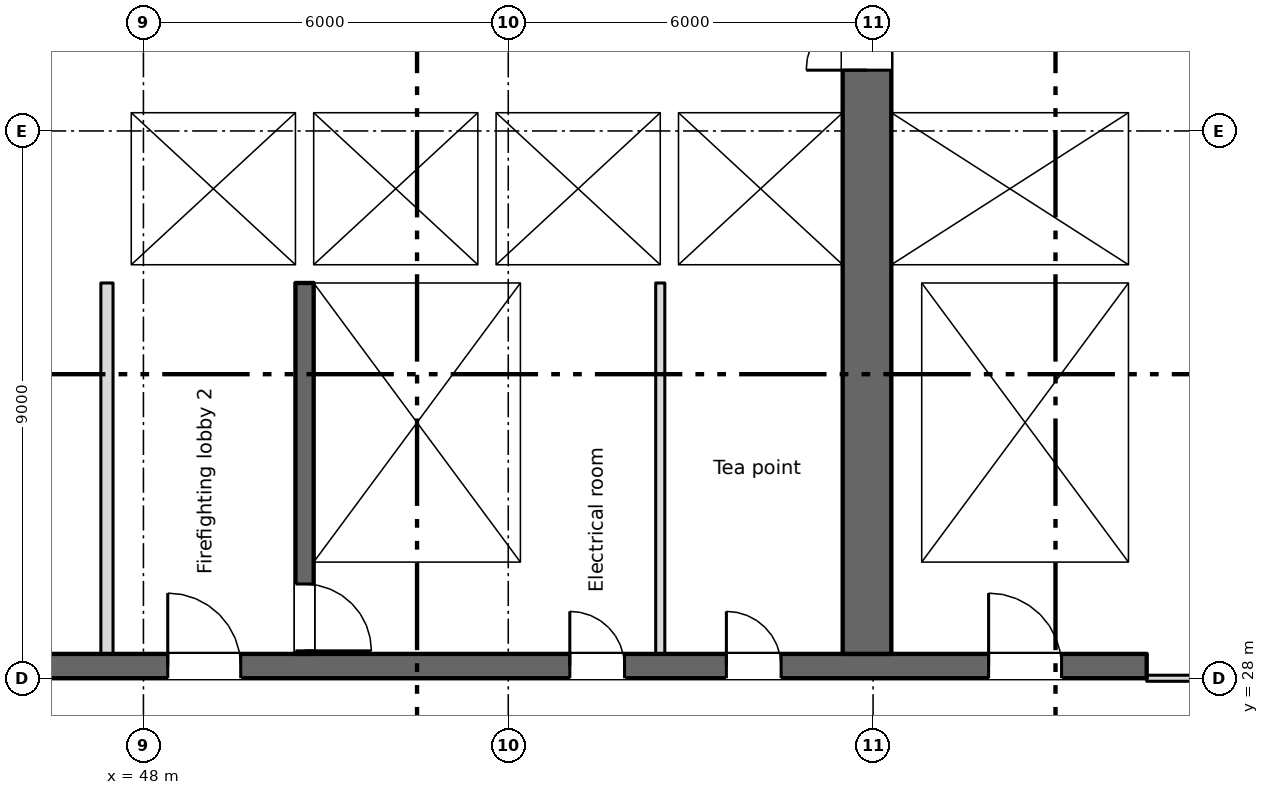
"""IFC4 building model, lengths in metres.
Left out: names, types, materials, properties, quantities, classifications, styles, units other than length and angle.
Written with IfcOpenShell. Run it as: python <this file> out.ifc"""

import sys

from ifc_helpers import new_model, si_unit, direction, frame, frame_2d, origin, place, context, subcontext, project, spatial, rectangle, extrude, element, fill, save


model = new_model("IFC4")
c1 = context("Model", 3, precision=1e-05, world=origin(), true_north=direction((0.0, 1.0)))
c2 = subcontext(c1, "Body", "Model", "MODEL_VIEW")
j1 = project(units=[si_unit("LENGTHUNIT", "METRE"), si_unit("PLANEANGLEUNIT", "RADIAN")], contexts=[c1])
p1 = place(None, origin())
s1 = spatial("IfcSite", under=j1, at=p1, CompositionType="ELEMENT")
p2 = place(p1, origin())
s2 = spatial("IfcBuilding", under=s1, at=p2, CompositionType="ELEMENT")
p3 = place(p2, frame((0.0, 0.0, 132.5)))
s3 = spatial("IfcBuildingStorey", under=s2, at=p3, CompositionType="ELEMENT", Elevation=132.5)
p4 = place(p3, frame((6.7, 28.2, 0.0), z_axis=(0.0, 0.0, 1.0), x_axis=(1.0, 0.0, 0.0)))
e1 = element("IfcWall", 1, at=p4, inside=s3, PredefinedType="SHEAR", context=c2, shape_type="SweptSolid", body=[
    extrude(rectangle(XDim=57.8, YDim=0.4, at=frame_2d((28.9, 0.0))), origin(), (0.0, 0.0, 1.0), 3.35),
])
p5 = place(p4, frame((12.812, 0.0, 0.0)))
e2 = element("IfcOpeningElement", 2, at=p5, cuts=e1, PredefinedType="OPENING", context=c2, shape_type="SweptSolid", body=[
    extrude(rectangle(XDim=0.9, YDim=2.1, at=frame_2d((0.45, 1.05))), frame((0.0, 0.21, 0.0), z_axis=(0.0, -1.0, 0.0), x_axis=(1.0, 0.0, 0.0)), (0.0, 0.0, 1.0), 0.42),
])
p6 = place(p4, frame((15.387, 0.0, 0.0)))
e3 = element("IfcOpeningElement", 3, at=p6, cuts=e1, PredefinedType="OPENING", context=c2, shape_type="SweptSolid", body=[
    extrude(rectangle(XDim=0.9, YDim=2.1, at=frame_2d((0.45, 1.05))), frame((0.0, 0.21, 0.0), z_axis=(0.0, -1.0, 0.0), x_axis=(1.0, 0.0, 0.0)), (0.0, 0.0, 1.0), 0.42),
])
p7 = place(p4, frame((48.312, 0.0, 0.0)))
e4 = element("IfcOpeningElement", 4, at=p7, cuts=e1, PredefinedType="OPENING", context=c2, shape_type="SweptSolid", body=[
    extrude(rectangle(XDim=0.9, YDim=2.1, at=frame_2d((0.45, 1.05))), frame((0.0, 0.21, 0.0), z_axis=(0.0, -1.0, 0.0), x_axis=(1.0, 0.0, 0.0)), (0.0, 0.0, 1.0), 0.42),
])
p8 = place(p4, frame((50.887, 0.0, 0.0)))
e5 = element("IfcOpeningElement", 5, at=p8, cuts=e1, PredefinedType="OPENING", context=c2, shape_type="SweptSolid", body=[
    extrude(rectangle(XDim=0.9, YDim=2.1, at=frame_2d((0.45, 1.05))), frame((0.0, 0.21, 0.0), z_axis=(0.0, -1.0, 0.0), x_axis=(1.0, 0.0, 0.0)), (0.0, 0.0, 1.0), 0.42),
])
p9 = place(p4, frame((0.562, 0.0, 0.0)))
e6 = element("IfcOpeningElement", 6, at=p9, cuts=e1, PredefinedType="OPENING", context=c2, shape_type="SweptSolid", body=[
    extrude(rectangle(XDim=0.9, YDim=2.1, at=frame_2d((0.45, 1.05))), frame((0.0, 0.21, 0.0), z_axis=(0.0, -1.0, 0.0), x_axis=(1.0, 0.0, 0.0)), (0.0, 0.0, 1.0), 0.42),
])
p10 = place(p4, frame((2.137, 0.0, 0.0)))
e7 = element("IfcOpeningElement", 7, at=p10, cuts=e1, PredefinedType="OPENING", context=c2, shape_type="SweptSolid", body=[
    extrude(rectangle(XDim=0.9, YDim=2.1, at=frame_2d((0.45, 1.05))), frame((0.0, 0.21, 0.0), z_axis=(0.0, -1.0, 0.0), x_axis=(1.0, 0.0, 0.0)), (0.0, 0.0, 1.0), 0.42),
])
p11 = place(p4, frame((4.7, 0.0, 0.0)))
e8 = element("IfcOpeningElement", 8, at=p11, cuts=e1, PredefinedType="OPENING", context=c2, shape_type="SweptSolid", body=[
    extrude(rectangle(XDim=1.2, YDim=2.1, at=frame_2d((0.6, 1.05))), frame((0.0, 0.21, 0.0), z_axis=(0.0, -1.0, 0.0), x_axis=(1.0, 0.0, 0.0)), (0.0, 0.0, 1.0), 0.42),
])
p12 = place(p4, frame((31.7, 0.0, 0.0)))
e9 = element("IfcOpeningElement", 9, at=p12, cuts=e1, PredefinedType="OPENING", context=c2, shape_type="SweptSolid", body=[
    extrude(rectangle(XDim=1.2, YDim=2.1, at=frame_2d((0.6, 1.05))), frame((0.0, 0.21, 0.0), z_axis=(0.0, -1.0, 0.0), x_axis=(1.0, 0.0, 0.0)), (0.0, 0.0, 1.0), 0.42),
])
p13 = place(p4, frame((55.2, 0.0, 0.0)))
e10 = element("IfcOpeningElement", 10, at=p13, cuts=e1, PredefinedType="OPENING", context=c2, shape_type="SweptSolid", body=[
    extrude(rectangle(XDim=1.2, YDim=2.1, at=frame_2d((0.6, 1.05))), frame((0.0, 0.21, 0.0), z_axis=(0.0, -1.0, 0.0), x_axis=(1.0, 0.0, 0.0)), (0.0, 0.0, 1.0), 0.42),
])
p14 = place(p4, frame((21.7, 0.0, 0.0)))
e11 = element("IfcOpeningElement", 11, at=p14, cuts=e1, PredefinedType="OPENING", context=c2, shape_type="SweptSolid", body=[
    extrude(rectangle(XDim=1.2, YDim=2.1, at=frame_2d((0.6, 1.05))), frame((0.0, 0.21, 0.0), z_axis=(0.0, -1.0, 0.0), x_axis=(1.0, 0.0, 0.0)), (0.0, 0.0, 1.0), 0.42),
])
p15 = place(p4, frame((41.7, 0.0, 0.0)))
e12 = element("IfcOpeningElement", 12, at=p15, cuts=e1, PredefinedType="OPENING", context=c2, shape_type="SweptSolid", body=[
    extrude(rectangle(XDim=1.2, YDim=2.1, at=frame_2d((0.6, 1.05))), frame((0.0, 0.21, 0.0), z_axis=(0.0, -1.0, 0.0), x_axis=(1.0, 0.0, 0.0)), (0.0, 0.0, 1.0), 0.42),
])
p16 = place(p4, frame((24.85, 0.0, 0.0)))
e13 = element("IfcOpeningElement", 13, at=p16, cuts=e1, PredefinedType="OPENING", context=c2, shape_type="SweptSolid", body=[
    extrude(rectangle(XDim=2.4, YDim=2.1, at=frame_2d((1.2, 1.05))), frame((0.0, 0.21, 0.0), z_axis=(0.0, -1.0, 0.0), x_axis=(1.0, 0.0, 0.0)), (0.0, 0.0, 1.0), 0.42),
])
p17 = place(p4, frame((37.35, 0.0, 0.0)))
e14 = element("IfcOpeningElement", 14, at=p17, cuts=e1, PredefinedType="OPENING", context=c2, shape_type="SweptSolid", body=[
    extrude(rectangle(XDim=2.4, YDim=2.1, at=frame_2d((1.2, 1.05))), frame((0.0, 0.21, 0.0), z_axis=(0.0, -1.0, 0.0), x_axis=(1.0, 0.0, 0.0)), (0.0, 0.0, 1.0), 0.42),
])
p18 = place(p4, frame((7.95, 0.0, 0.0)))
e15 = element("IfcOpeningElement", 15, at=p18, cuts=e1, PredefinedType="OPENING", context=c2, shape_type="SweptSolid", body=[
    extrude(rectangle(XDim=2.4, YDim=2.1, at=frame_2d((1.2, 1.05))), frame((0.0, 0.21, 0.0), z_axis=(0.0, -1.0, 0.0), x_axis=(1.0, 0.0, 0.0)), (0.0, 0.0, 1.0), 0.42),
])
p19 = place(p4, frame((28.85, 0.0, 0.0)))
e16 = element("IfcOpeningElement", 16, at=p19, cuts=e1, PredefinedType="OPENING", context=c2, shape_type="SweptSolid", body=[
    extrude(rectangle(XDim=0.9, YDim=2.1, at=frame_2d((0.45, 1.05))), frame((0.0, 0.21, 0.0), z_axis=(0.0, -1.0, 0.0), x_axis=(1.0, 0.0, 0.0)), (0.0, 0.0, 1.0), 0.42),
])
p20 = place(p4, frame((34.85, 0.0, 0.0)))
e17 = element("IfcOpeningElement", 17, at=p20, cuts=e1, PredefinedType="OPENING", context=c2, shape_type="SweptSolid", body=[
    extrude(rectangle(XDim=0.9, YDim=2.1, at=frame_2d((0.45, 1.05))), frame((0.0, 0.21, 0.0), z_axis=(0.0, -1.0, 0.0), x_axis=(1.0, 0.0, 0.0)), (0.0, 0.0, 1.0), 0.42),
])
p21 = place(p3, frame((64.35, 34.8, 0.0), z_axis=(0.0, 0.0, 1.0), x_axis=(0.0, 1.0, 0.0)))
e18 = element("IfcWall", 18, at=p21, inside=s3, PredefinedType="SHEAR", context=c2, shape_type="SweptSolid", body=[
    extrude(rectangle(XDim=10.4, YDim=0.3, at=frame_2d((5.2, 0.0))), origin(), (0.0, 0.0, 1.0), 3.35),
])
p22 = place(p3, frame((59.9, 28.4, 0.0), z_axis=(0.0, 0.0, 1.0), x_axis=(0.0, 1.0, 0.0)))
e19 = element("IfcWall", 19, at=p22, inside=s3, PredefinedType="SHEAR", context=c2, shape_type="SweptSolid", body=[
    extrude(rectangle(XDim=16.8, YDim=0.8, at=frame_2d((8.4, 0.0))), origin(), (0.0, 0.0, 1.0), 3.35),
])
p23 = place(p22, frame((9.6, 0.0, 0.0)))
e20 = element("IfcOpeningElement", 20, at=p23, cuts=e19, PredefinedType="OPENING", context=c2, shape_type="SweptSolid", body=[
    extrude(rectangle(XDim=2.0, YDim=2.1, at=frame_2d((1.0, 1.05))), frame((0.0, 0.41, 0.0), z_axis=(0.0, -1.0, 0.0), x_axis=(1.0, 0.0, 0.0)), (0.0, 0.0, 1.0), 0.82),
])
p24 = place(p22, frame((15.35, 0.0, 0.0)))
e21 = element("IfcOpeningElement", 21, at=p24, cuts=e19, PredefinedType="OPENING", context=c2, shape_type="SweptSolid", body=[
    extrude(rectangle(XDim=1.2, YDim=2.1, at=frame_2d((0.6, 1.05))), frame((0.0, 0.41, 0.0), z_axis=(0.0, -1.0, 0.0), x_axis=(1.0, 0.0, 0.0)), (0.0, 0.0, 1.0), 0.82),
])
p25 = place(p3, frame((50.65, 34.5, 0.0), z_axis=(0.0, 0.0, 1.0), x_axis=(0.0, -1.0, 0.0)))
e22 = element("IfcWall", 22, at=p25, inside=s3, PredefinedType="SHEAR", context=c2, shape_type="SweptSolid", body=[
    extrude(rectangle(XDim=6.1, YDim=0.3, at=frame_2d((3.05, 0.0))), origin(), (0.0, 0.0, 1.0), 3.35),
])
p26 = place(p25, frame((4.95, 0.0, 0.0)))
e23 = element("IfcOpeningElement", 23, at=p26, cuts=e22, PredefinedType="OPENING", context=c2, shape_type="SweptSolid", body=[
    extrude(rectangle(XDim=1.1, YDim=2.1, at=frame_2d((0.55, 1.05))), frame((0.0, 0.16, 0.0), z_axis=(0.0, -1.0, 0.0), x_axis=(1.0, 0.0, 0.0)), (0.0, 0.0, 1.0), 0.32),
])
p27 = place(p3, frame((54.35, 28.4, 0.0), z_axis=(0.0, 0.0, 1.0), x_axis=(0.0, 1.0, 0.0)))
e24 = element("IfcWall", 24, at=p27, inside=s3, PredefinedType="SHEAR", context=c2, shape_type="SweptSolid", body=[
    extrude(rectangle(XDim=6.1, YDim=0.3, at=frame_2d((3.05, 0.0))), origin(), (0.0, 0.0, 1.0), 3.35),
])
p28 = place(p3, frame((60.55, 28.4, 0.0), z_axis=(0.0, 0.0, 1.0), x_axis=(0.0, 1.0, 0.0)))
e25 = element("IfcWall", 25, at=p28, inside=s3, PredefinedType="SHEAR", context=c2, shape_type="SweptSolid", body=[
    extrude(rectangle(XDim=6.1, YDim=0.5, at=frame_2d((3.05, 0.0))), origin(), (0.0, 0.0, 1.0), 3.35),
])
p29 = place(p3, frame((64.35, 28.4, 0.0), z_axis=(0.0, 0.0, 1.0), x_axis=(0.0, 1.0, 0.0)))
e26 = element("IfcWall", 26, at=p29, inside=s3, PredefinedType="SHEAR", context=c2, shape_type="SweptSolid", body=[
    extrude(rectangle(XDim=6.1, YDim=0.3, at=frame_2d((3.05, 0.0))), origin(), (0.0, 0.0, 1.0), 3.35),
])
p30 = place(p3, frame((47.3, 34.65, 0.0), z_axis=(0.0, 0.0, 1.0), x_axis=(1.0, 0.0, 0.0)))
e27 = element("IfcWall", 27, at=p30, inside=s3, PredefinedType="SHEAR", context=c2, shape_type="SweptSolid", body=[
    extrude(rectangle(XDim=12.2, YDim=0.3, at=frame_2d((6.1, 0.0))), origin(), (0.0, 0.0, 1.0), 3.35),
])
p31 = place(p30, frame((1.3, 0.0, 0.0)))
e28 = element("IfcOpeningElement", 28, at=p31, cuts=e27, PredefinedType="OPENING", context=c2, shape_type="SweptSolid", body=[
    extrude(rectangle(XDim=1.1, YDim=2.1, at=frame_2d((0.55, 1.05))), frame((0.0, 0.16, 0.0), z_axis=(0.0, -1.0, 0.0), x_axis=(1.0, 0.0, 0.0)), (0.0, 0.0, 1.0), 0.32),
])
p32 = place(p3, frame((60.3, 34.65, 0.0), z_axis=(0.0, 0.0, 1.0), x_axis=(1.0, 0.0, 0.0)))
e29 = element("IfcWall", 29, at=p32, inside=s3, PredefinedType="SHEAR", context=c2, shape_type="SweptSolid", body=[
    extrude(rectangle(XDim=4.2, YDim=0.3, at=frame_2d((2.1, 0.0))), origin(), (0.0, 0.0, 1.0), 3.35),
])
p33 = place(p3, frame((47.3, 37.45, 0.0), z_axis=(0.0, 0.0, 1.0), x_axis=(1.0, 0.0, 0.0)))
e30 = element("IfcWall", 30, at=p33, inside=s3, PredefinedType="SHEAR", context=c2, shape_type="SweptSolid", body=[
    extrude(rectangle(XDim=12.2, YDim=0.3, at=frame_2d((6.1, 0.0))), origin(), (0.0, 0.0, 1.0), 3.35),
])
p34 = place(p33, frame((4.3, 0.0, 0.0)))
e31 = element("IfcOpeningElement", 31, at=p34, cuts=e30, PredefinedType="OPENING", context=c2, shape_type="SweptSolid", body=[
    extrude(rectangle(XDim=1.1, YDim=2.1, at=frame_2d((0.55, 1.05))), frame((0.0, 0.16, 0.0), z_axis=(0.0, -1.0, 0.0), x_axis=(1.0, 0.0, 0.0)), (0.0, 0.0, 1.0), 0.32),
])
p35 = place(p33, frame((7.3, 0.0, 0.0)))
e32 = element("IfcOpeningElement", 32, at=p35, cuts=e30, PredefinedType="OPENING", context=c2, shape_type="SweptSolid", body=[
    extrude(rectangle(XDim=1.1, YDim=2.1, at=frame_2d((0.55, 1.05))), frame((0.0, 0.16, 0.0), z_axis=(0.0, -1.0, 0.0), x_axis=(1.0, 0.0, 0.0)), (0.0, 0.0, 1.0), 0.32),
])
p36 = place(p33, frame((10.3, 0.0, 0.0)))
e33 = element("IfcOpeningElement", 33, at=p36, cuts=e30, PredefinedType="OPENING", context=c2, shape_type="SweptSolid", body=[
    extrude(rectangle(XDim=1.1, YDim=2.1, at=frame_2d((0.55, 1.05))), frame((0.0, 0.16, 0.0), z_axis=(0.0, -1.0, 0.0), x_axis=(1.0, 0.0, 0.0)), (0.0, 0.0, 1.0), 0.32),
])
p37 = place(p3, frame((60.3, 37.45, 0.0), z_axis=(0.0, 0.0, 1.0), x_axis=(1.0, 0.0, 0.0)))
e34 = element("IfcWall", 34, at=p37, inside=s3, PredefinedType="SHEAR", context=c2, shape_type="SweptSolid", body=[
    extrude(rectangle(XDim=3.9, YDim=0.3, at=frame_2d((1.95, 0.0))), origin(), (0.0, 0.0, 1.0), 3.35),
])
p38 = place(p37, frame((1.4, 0.0, 0.0)))
e35 = element("IfcOpeningElement", 35, at=p38, cuts=e34, PredefinedType="OPENING", context=c2, shape_type="SweptSolid", body=[
    extrude(rectangle(XDim=1.1, YDim=2.1, at=frame_2d((0.55, 1.05))), frame((0.0, 0.16, 0.0), z_axis=(0.0, -1.0, 0.0), x_axis=(1.0, 0.0, 0.0)), (0.0, 0.0, 1.0), 0.32),
])
p39 = place(p3, frame((47.55, 34.8, 0.0), z_axis=(0.0, 0.0, 1.0), x_axis=(0.0, 1.0, 0.0)))
e36 = element("IfcWall", 36, at=p39, inside=s3, PredefinedType="SHEAR", context=c2, shape_type="SweptSolid", body=[
    extrude(rectangle(XDim=2.5, YDim=0.5, at=frame_2d((1.25, 0.0))), origin(), (0.0, 0.0, 1.0), 3.35),
])
for number, where, z_axis, x_axis in (
    (37, (50.65, 34.8, 0.0), (0.0, 0.0, 1.0), (0.0, 1.0, 0.0)),
    (38, (53.65, 34.8, 0.0), (0.0, 0.0, 1.0), (0.0, 1.0, 0.0)),
    (39, (56.65, 34.8, 0.0), (0.0, 0.0, 1.0), (0.0, 1.0, 0.0)),
):
    element("IfcWall", number, at=place(p3, frame(where, z_axis=z_axis, x_axis=x_axis)), inside=s3, PredefinedType="SHEAR", context=c2, shape_type="SweptSolid", body=[
        extrude(rectangle(XDim=2.5, YDim=0.3, at=frame_2d((1.25, 0.0))), origin(), (0.0, 0.0, 1.0), 3.35),
    ])
p40 = place(p3, frame((47.4, 28.4, 0.0), z_axis=(0.0, 0.0, 1.0), x_axis=(0.0, 1.0, 0.0)))
e40 = element("IfcWall", 40, at=p40, inside=s3, PredefinedType="PARTITIONING", context=c2, shape_type="SweptSolid", body=[
    extrude(rectangle(XDim=6.1, YDim=0.2, at=frame_2d((3.05, 0.0))), origin(), (0.0, 0.0, 1.0), 3.35),
])
p41 = place(p3, frame((56.5, 28.4, 0.0), z_axis=(0.0, 0.0, 1.0), x_axis=(0.0, 1.0, 0.0)))
e41 = element("IfcWall", 41, at=p41, inside=s3, PredefinedType="PARTITIONING", context=c2, shape_type="SweptSolid", body=[
    extrude(rectangle(XDim=6.1, YDim=0.15, at=frame_2d((3.05, 0.0))), origin(), (0.0, 0.0, 1.0), 3.35),
])
p42 = place(p3, frame((64.5, 28.0, 0.0), z_axis=(0.0, 0.0, 1.0), x_axis=(1.0, 0.0, 0.0)))
e42 = element("IfcWall", 42, at=p42, inside=s3, PredefinedType="PARTITIONING", context=c2, shape_type="SweptSolid", body=[
    extrude(rectangle(XDim=6.8, YDim=0.1, at=frame_2d((3.4, 0.0))), origin(), (0.0, 0.0, 1.0), 3.35),
])
p43 = place(p42, frame((2.5, 0.0, 0.0)))
e43 = element("IfcOpeningElement", 43, at=p43, cuts=e42, PredefinedType="OPENING", context=c2, shape_type="SweptSolid", body=[
    extrude(rectangle(XDim=1.8, YDim=2.1, at=frame_2d((0.9, 1.05))), frame((0.0, 0.06, 0.0), z_axis=(0.0, -1.0, 0.0), x_axis=(1.0, 0.0, 0.0)), (0.0, 0.0, 1.0), 0.12),
])
p44 = place(p7, origin())
e44 = element("IfcDoor", 44, at=p44, inside=s3, OperationType="SINGLE_SWING_LEFT", PredefinedType="DOOR", context=c2, shape_type="SweptSolid", body=[
    extrude(rectangle(XDim=0.9, YDim=2.1, at=frame_2d((0.45, 1.05))), frame((0.0, 0.025, 0.0), z_axis=(0.0, -1.0, 0.0), x_axis=(1.0, 0.0, 0.0)), (0.0, 0.0, 1.0), 0.05),
])
fill(e4, e44)
p45 = place(p8, origin())
e45 = element("IfcDoor", 45, at=p45, inside=s3, OperationType="SINGLE_SWING_LEFT", PredefinedType="DOOR", context=c2, shape_type="SweptSolid", body=[
    extrude(rectangle(XDim=0.9, YDim=2.1, at=frame_2d((0.45, 1.05))), frame((0.0, 0.025, 0.0), z_axis=(0.0, -1.0, 0.0), x_axis=(1.0, 0.0, 0.0)), (0.0, 0.0, 1.0), 0.05),
])
fill(e5, e45)
p46 = place(p34, origin())
e46 = element("IfcDoor", 46, at=p46, inside=s3, OperationType="SLIDING_TO_LEFT", PredefinedType="DOOR", context=c2, shape_type="SweptSolid", body=[
    extrude(rectangle(XDim=1.1, YDim=2.1, at=frame_2d((0.55, 1.05))), frame((0.0, 0.025, 0.0), z_axis=(0.0, -1.0, 0.0), x_axis=(1.0, 0.0, 0.0)), (0.0, 0.0, 1.0), 0.05),
])
fill(e31, e46)
p47 = place(p35, origin())
e47 = element("IfcDoor", 47, at=p47, inside=s3, OperationType="SLIDING_TO_LEFT", PredefinedType="DOOR", context=c2, shape_type="SweptSolid", body=[
    extrude(rectangle(XDim=1.1, YDim=2.1, at=frame_2d((0.55, 1.05))), frame((0.0, 0.025, 0.0), z_axis=(0.0, -1.0, 0.0), x_axis=(1.0, 0.0, 0.0)), (0.0, 0.0, 1.0), 0.05),
])
fill(e32, e47)
p48 = place(p36, origin())
e48 = element("IfcDoor", 48, at=p48, inside=s3, OperationType="SLIDING_TO_LEFT", PredefinedType="DOOR", context=c2, shape_type="SweptSolid", body=[
    extrude(rectangle(XDim=1.1, YDim=2.1, at=frame_2d((0.55, 1.05))), frame((0.0, 0.025, 0.0), z_axis=(0.0, -1.0, 0.0), x_axis=(1.0, 0.0, 0.0)), (0.0, 0.0, 1.0), 0.05),
])
fill(e33, e48)
p49 = place(p38, origin())
e49 = element("IfcDoor", 49, at=p49, inside=s3, OperationType="SLIDING_TO_LEFT", PredefinedType="DOOR", context=c2, shape_type="SweptSolid", body=[
    extrude(rectangle(XDim=1.1, YDim=2.1, at=frame_2d((0.55, 1.05))), frame((0.0, 0.025, 0.0), z_axis=(0.0, -1.0, 0.0), x_axis=(1.0, 0.0, 0.0)), (0.0, 0.0, 1.0), 0.05),
])
fill(e35, e49)
p50 = place(p31, origin())
e50 = element("IfcDoor", 50, at=p50, inside=s3, OperationType="SLIDING_TO_LEFT", PredefinedType="DOOR", context=c2, shape_type="SweptSolid", body=[
    extrude(rectangle(XDim=1.1, YDim=2.1, at=frame_2d((0.55, 1.05))), frame((0.0, 0.025, 0.0), z_axis=(0.0, -1.0, 0.0), x_axis=(1.0, 0.0, 0.0)), (0.0, 0.0, 1.0), 0.05),
])
fill(e28, e50)
p51 = place(p26, origin())
e51 = element("IfcDoor", 51, at=p51, inside=s3, OperationType="SINGLE_SWING_RIGHT", PredefinedType="DOOR", context=c2, shape_type="SweptSolid", body=[
    extrude(rectangle(XDim=1.1, YDim=2.1, at=frame_2d((0.55, 1.05))), frame((0.0, 0.025, 0.0), z_axis=(0.0, -1.0, 0.0), x_axis=(1.0, 0.0, 0.0)), (0.0, 0.0, 1.0), 0.05),
])
fill(e23, e51)
p52 = place(p13, origin())
e52 = element("IfcDoor", 52, at=p52, inside=s3, OperationType="SINGLE_SWING_LEFT", PredefinedType="DOOR", context=c2, shape_type="SweptSolid", body=[
    extrude(rectangle(XDim=1.2, YDim=2.1, at=frame_2d((0.6, 1.05))), frame((0.0, 0.025, 0.0), z_axis=(0.0, -1.0, 0.0), x_axis=(1.0, 0.0, 0.0)), (0.0, 0.0, 1.0), 0.05),
])
fill(e10, e52)
p53 = place(p15, origin())
e53 = element("IfcDoor", 53, at=p53, inside=s3, OperationType="SINGLE_SWING_LEFT", PredefinedType="DOOR", context=c2, shape_type="SweptSolid", body=[
    extrude(rectangle(XDim=1.2, YDim=2.1, at=frame_2d((0.6, 1.05))), frame((0.0, 0.025, 0.0), z_axis=(0.0, -1.0, 0.0), x_axis=(1.0, 0.0, 0.0)), (0.0, 0.0, 1.0), 0.05),
])
fill(e12, e53)
p54 = place(p23, origin())
e54 = element("IfcDoor", 54, at=p54, inside=s3, OperationType="DOUBLE_DOOR_SINGLE_SWING", PredefinedType="DOOR", context=c2, shape_type="SweptSolid", body=[
    extrude(rectangle(XDim=2.0, YDim=2.1, at=frame_2d((1.0, 1.05))), frame((0.0, 0.025, 0.0), z_axis=(0.0, -1.0, 0.0), x_axis=(1.0, 0.0, 0.0)), (0.0, 0.0, 1.0), 0.05),
])
fill(e20, e54)
save(model, sys.argv[1])
